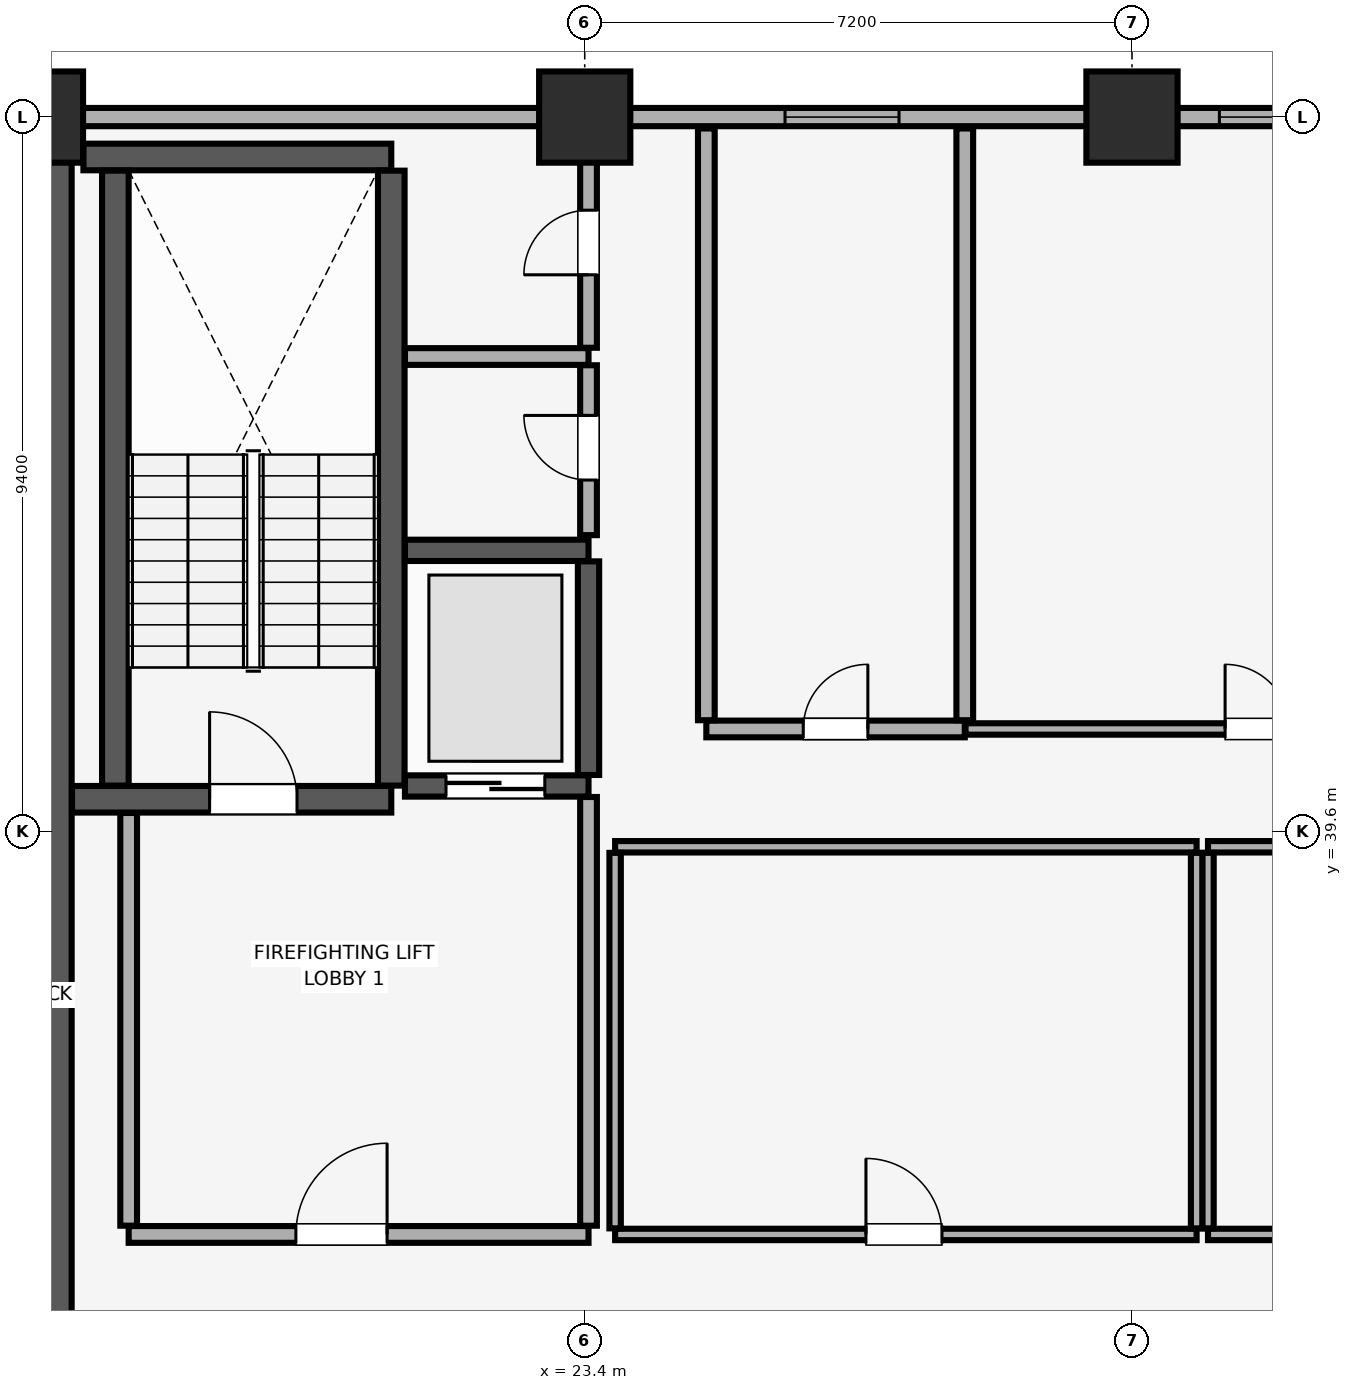
"""IFC4 building model, lengths in metres.
Left out: names, types, materials, properties, quantities, classifications, styles, units other than length and angle.
Written with IfcOpenShell. Run it as: python <this file> out.ifc"""

import sys

from ifc_helpers import new_model, si_unit, direction, frame, frame_2d, origin, origin_2d, place, context, subcontext, project, spatial, rectangle, extrude, element, fill, save


model = new_model("IFC4")
c1 = context("Model", 3, precision=1e-05, world=origin(), true_north=direction((0.0, 1.0)))
c2 = subcontext(c1, "Body", "Model", "MODEL_VIEW")
j1 = project(units=[si_unit("LENGTHUNIT", "METRE"), si_unit("PLANEANGLEUNIT", "RADIAN")], contexts=[c1])
p1 = place(None, origin())
s1 = spatial("IfcSite", under=j1, at=p1, CompositionType="ELEMENT")
p2 = place(p1, origin())
s2 = spatial("IfcBuilding", under=s1, at=p2, CompositionType="ELEMENT")
p3 = place(p2, frame((0.0, 0.0, 180.95)))
s3 = spatial("IfcBuildingStorey", under=s2, at=p3, CompositionType="ELEMENT", Elevation=180.95)
for number, where, z_axis, x_axis in (
    (1, (16.2, 49.0, 0.0), (0.0, 0.0, 1.0), (1.0, 0.0, 0.0)),
    (2, (23.4, 49.0, 0.0), (0.0, 0.0, 1.0), (1.0, 0.0, 0.0)),
    (3, (30.6, 49.0, 0.0), (0.0, 0.0, 1.0), (1.0, 0.0, 0.0)),
):
    element("IfcColumn", number, at=place(p3, frame(where, z_axis=z_axis, x_axis=x_axis)), inside=s3, PredefinedType="COLUMN", context=c2, shape_type="SweptSolid", body=[
        extrude(rectangle(XDim=1.2, YDim=1.2, at=origin_2d()), origin(), (0.0, 0.0, 1.0), 3.45),
    ])
p4 = place(p3, frame((77.0, 49.0, 0.0), z_axis=(0.0, 0.0, 1.0), x_axis=(-1.0, 0.0, 0.0)))
e4 = element("IfcWall", 4, at=p4, inside=s3, PredefinedType="SOLIDWALL", context=c2, shape_type="SweptSolid", body=[
    extrude(rectangle(XDim=70.0, YDim=0.24, at=frame_2d((35.0, 0.0))), origin(), (0.0, 0.0, 1.0), 2.65),
])
p5 = place(p4, frame((63.7, 0.0, 0.85)))
e5 = element("IfcOpeningElement", 5, at=p5, cuts=e4, PredefinedType="OPENING", context=c2, shape_type="SweptSolid", body=[
    extrude(rectangle(XDim=3.0, YDim=1.5, at=frame_2d((1.5, 0.75))), frame((0.0, 0.13, 0.0), z_axis=(0.0, -1.0, 0.0), x_axis=(1.0, 0.0, 0.0)), (0.0, 0.0, 1.0), 0.26),
])
p6 = place(p4, frame((3.3, 0.0, 0.85)))
e6 = element("IfcOpeningElement", 6, at=p6, cuts=e4, PredefinedType="OPENING", context=c2, shape_type="SweptSolid", body=[
    extrude(rectangle(XDim=3.0, YDim=1.5, at=frame_2d((1.5, 0.75))), frame((0.0, 0.13, 0.0), z_axis=(0.0, -1.0, 0.0), x_axis=(1.0, 0.0, 0.0)), (0.0, 0.0, 1.0), 0.26),
])
p7 = place(p4, frame((49.465, 0.0, 0.9)))
e7 = element("IfcOpeningElement", 7, at=p7, cuts=e4, PredefinedType="OPENING", context=c2, shape_type="SweptSolid", body=[
    extrude(rectangle(XDim=1.5, YDim=1.4, at=frame_2d((0.75, 0.7))), frame((0.0, 0.13, 0.0), z_axis=(0.0, -1.0, 0.0), x_axis=(1.0, 0.0, 0.0)), (0.0, 0.0, 1.0), 0.26),
])
p8 = place(p4, frame((41.65, 0.0, 0.9)))
e8 = element("IfcOpeningElement", 8, at=p8, cuts=e4, PredefinedType="OPENING", context=c2, shape_type="SweptSolid", body=[
    extrude(rectangle(XDim=3.6, YDim=1.5, at=frame_2d((1.8, 0.75))), frame((0.0, 0.13, 0.0), z_axis=(0.0, -1.0, 0.0), x_axis=(1.0, 0.0, 0.0)), (0.0, 0.0, 1.0), 0.26),
])
p9 = place(p4, frame((28.25, 0.0, 0.9)))
e9 = element("IfcOpeningElement", 9, at=p9, cuts=e4, PredefinedType="OPENING", context=c2, shape_type="SweptSolid", body=[
    extrude(rectangle(XDim=1.5, YDim=1.4, at=frame_2d((0.75, 0.7))), frame((0.0, 0.13, 0.0), z_axis=(0.0, -1.0, 0.0), x_axis=(1.0, 0.0, 0.0)), (0.0, 0.0, 1.0), 0.26),
])
p10 = place(p4, frame((24.6, 0.0, 0.9)))
e10 = element("IfcOpeningElement", 10, at=p10, cuts=e4, PredefinedType="OPENING", context=c2, shape_type="SweptSolid", body=[
    extrude(rectangle(XDim=2.4, YDim=1.5, at=frame_2d((1.2, 0.75))), frame((0.0, 0.13, 0.0), z_axis=(0.0, -1.0, 0.0), x_axis=(1.0, 0.0, 0.0)), (0.0, 0.0, 1.0), 0.26),
])
p11 = place(p4, frame((20.235, 0.0, 0.9)))
e11 = element("IfcOpeningElement", 11, at=p11, cuts=e4, PredefinedType="OPENING", context=c2, shape_type="SweptSolid", body=[
    extrude(rectangle(XDim=2.4, YDim=1.5, at=frame_2d((1.2, 0.75))), frame((0.0, 0.13, 0.0), z_axis=(0.0, -1.0, 0.0), x_axis=(1.0, 0.0, 0.0)), (0.0, 0.0, 1.0), 0.26),
])
p12 = place(p3, frame((16.2, 29.4, 0.0), z_axis=(0.0, 0.0, 1.0), x_axis=(0.0, 1.0, 0.0)))
e12 = element("IfcWall", 12, at=p12, inside=s3, PredefinedType="SHEAR", context=c2, shape_type="SweptSolid", body=[
    extrude(rectangle(XDim=19.2, YDim=0.9, at=frame_2d((9.6, 0.0))), origin(), (0.0, 0.0, 1.0), 3.45),
])
p13 = place(p3, frame((16.655, 40.025, 0.0), z_axis=(0.0, 0.0, 1.0), x_axis=(1.0, 0.0, 0.0)))
e13 = element("IfcWall", 13, at=p13, inside=s3, PredefinedType="SHEAR", context=c2, shape_type="SweptSolid", body=[
    extrude(rectangle(XDim=4.2, YDim=0.35, at=frame_2d((2.1, 0.0))), origin(), (0.0, 0.0, 1.0), 3.45),
])
p14 = place(p13, frame((1.81, 0.0, 0.0)))
e14 = element("IfcOpeningElement", 14, at=p14, cuts=e13, PredefinedType="OPENING", context=c2, shape_type="SweptSolid", body=[
    extrude(rectangle(XDim=1.15, YDim=2.15, at=frame_2d((0.575, 1.075))), frame((0.0, 0.185, 0.0), z_axis=(0.0, -1.0, 0.0), x_axis=(1.0, 0.0, 0.0)), (0.0, 0.0, 1.0), 0.37),
])
p15 = place(p3, frame((16.805, 48.475, 0.0), z_axis=(0.0, 0.0, 1.0), x_axis=(1.0, 0.0, 0.0)))
e15 = element("IfcWall", 15, at=p15, inside=s3, PredefinedType="SHEAR", context=c2, shape_type="SweptSolid", body=[
    extrude(rectangle(XDim=4.05, YDim=0.35, at=frame_2d((2.025, 0.0))), origin(), (0.0, 0.0, 1.0), 3.45),
])
for number, where, z_axis, x_axis in (
    (16, (17.225, 40.205, 0.0), (0.0, 0.0, 1.0), (0.0, 1.0, 0.0)),
    (17, (20.855, 40.205, 0.0), (0.0, 0.0, 1.0), (0.0, 1.0, 0.0)),
):
    element("IfcWall", number, at=place(p3, frame(where, z_axis=z_axis, x_axis=x_axis)), inside=s3, PredefinedType="SHEAR", context=c2, shape_type="SweptSolid", body=[
        extrude(rectangle(XDim=8.09, YDim=0.35, at=frame_2d((4.045, 0.0))), origin(), (0.0, 0.0, 1.0), 3.45),
    ])
p16 = place(p3, frame((21.035, 40.2, 0.0), z_axis=(0.0, 0.0, 1.0), x_axis=(1.0, 0.0, 0.0)))
e18 = element("IfcWall", 18, at=p16, inside=s3, PredefinedType="SHEAR", context=c2, shape_type="SweptSolid", body=[
    extrude(rectangle(XDim=2.415, YDim=0.28, at=frame_2d((1.208, 0.0))), origin(), (0.0, 0.0, 1.0), 3.45),
])
p17 = place(p16, frame((0.54, 0.0, 0.0)))
e19 = element("IfcOpeningElement", 19, at=p17, cuts=e18, PredefinedType="OPENING", context=c2, shape_type="SweptSolid", body=[
    extrude(rectangle(XDim=1.3, YDim=2.3, at=frame_2d((0.65, 1.15))), frame((0.0, 0.15, 0.0), z_axis=(0.0, -1.0, 0.0), x_axis=(1.0, 0.0, 0.0)), (0.0, 0.0, 1.0), 0.3),
])
p18 = place(p3, frame((21.035, 43.3, 0.0), z_axis=(0.0, 0.0, 1.0), x_axis=(1.0, 0.0, 0.0)))
e20 = element("IfcWall", 20, at=p18, inside=s3, PredefinedType="SHEAR", context=c2, shape_type="SweptSolid", body=[
    extrude(rectangle(XDim=2.415, YDim=0.28, at=frame_2d((1.208, 0.0))), origin(), (0.0, 0.0, 1.0), 3.45),
])
p19 = place(p3, frame((23.45, 40.345, 0.0), z_axis=(0.0, 0.0, 1.0), x_axis=(0.0, 1.0, 0.0)))
e21 = element("IfcWall", 21, at=p19, inside=s3, PredefinedType="SHEAR", context=c2, shape_type="SweptSolid", body=[
    extrude(rectangle(XDim=2.81, YDim=0.28, at=frame_2d((1.405, 0.0))), origin(), (0.0, 0.0, 1.0), 3.45),
])
p20 = place(p3, frame((17.4, 34.3, 0.0), z_axis=(0.0, 0.0, 1.0), x_axis=(1.0, 0.0, 0.0)))
e22 = element("IfcWall", 22, at=p20, inside=s3, PredefinedType="PARTITIONING", context=c2, shape_type="SweptSolid", body=[
    extrude(rectangle(XDim=6.05, YDim=0.22, at=frame_2d((3.025, 0.0))), origin(), (0.0, 0.0, 1.0), 3.45),
])
p21 = place(p20, frame((2.2, 0.0, 0.0)))
e23 = element("IfcOpeningElement", 23, at=p21, cuts=e22, PredefinedType="OPENING", context=c2, shape_type="SweptSolid", body=[
    extrude(rectangle(XDim=1.2, YDim=2.15, at=frame_2d((0.6, 1.075))), frame((0.0, 0.12, 0.0), z_axis=(0.0, -1.0, 0.0), x_axis=(1.0, 0.0, 0.0)), (0.0, 0.0, 1.0), 0.24),
])
p22 = place(p3, frame((17.4, 34.415, 0.0), z_axis=(0.0, 0.0, 1.0), x_axis=(0.0, 1.0, 0.0)))
e24 = element("IfcWall", 24, at=p22, inside=s3, PredefinedType="PARTITIONING", context=c2, shape_type="SweptSolid", body=[
    extrude(rectangle(XDim=5.43, YDim=0.22, at=frame_2d((2.715, 0.0))), origin(), (0.0, 0.0, 1.0), 3.45),
])
p23 = place(p3, frame((23.45, 34.415, 0.0), z_axis=(0.0, 0.0, 1.0), x_axis=(0.0, 1.0, 0.0)))
e25 = element("IfcWall", 25, at=p23, inside=s3, PredefinedType="PARTITIONING", context=c2, shape_type="SweptSolid", body=[
    extrude(rectangle(XDim=5.64, YDim=0.22, at=frame_2d((2.82, 0.0))), origin(), (0.0, 0.0, 1.0), 3.45),
])
p24 = place(p3, frame((21.035, 45.85, 0.0), z_axis=(0.0, 0.0, 1.0), x_axis=(1.0, 0.0, 0.0)))
e26 = element("IfcWall", 26, at=p24, inside=s3, PredefinedType="PARTITIONING", context=c2, shape_type="SweptSolid", body=[
    extrude(rectangle(XDim=2.415, YDim=0.22, at=frame_2d((1.208, 0.0))), origin(), (0.0, 0.0, 1.0), 3.45),
])
p25 = place(p3, frame((23.45, 43.5, 0.0), z_axis=(0.0, 0.0, 1.0), x_axis=(0.0, 1.0, 0.0)))
e27 = element("IfcWall", 27, at=p25, inside=s3, PredefinedType="PARTITIONING", context=c2, shape_type="SweptSolid", body=[
    extrude(rectangle(XDim=2.235, YDim=0.22, at=frame_2d((1.118, 0.0))), origin(), (0.0, 0.0, 1.0), 3.45),
])
p26 = place(p25, frame((0.725, 0.0, 0.0)))
e28 = element("IfcOpeningElement", 28, at=p26, cuts=e27, PredefinedType="OPENING", context=c2, shape_type="SweptSolid", body=[
    extrude(rectangle(XDim=0.85, YDim=2.1, at=frame_2d((0.425, 1.05))), frame((0.0, 0.12, 0.0), z_axis=(0.0, -1.0, 0.0), x_axis=(1.0, 0.0, 0.0)), (0.0, 0.0, 1.0), 0.24),
])
p27 = place(p3, frame((23.45, 45.965, 0.0), z_axis=(0.0, 0.0, 1.0), x_axis=(0.0, 1.0, 0.0)))
e29 = element("IfcWall", 29, at=p27, inside=s3, PredefinedType="PARTITIONING", context=c2, shape_type="SweptSolid", body=[
    extrude(rectangle(XDim=2.885, YDim=0.22, at=frame_2d((1.442, 0.0))), origin(), (0.0, 0.0, 1.0), 3.45),
])
p28 = place(p27, frame((0.96, 0.0, 0.0)))
e30 = element("IfcOpeningElement", 30, at=p28, cuts=e29, PredefinedType="OPENING", context=c2, shape_type="SweptSolid", body=[
    extrude(rectangle(XDim=0.85, YDim=2.1, at=frame_2d((0.425, 1.05))), frame((0.0, 0.12, 0.0), z_axis=(0.0, -1.0, 0.0), x_axis=(1.0, 0.0, 0.0)), (0.0, 0.0, 1.0), 0.24),
])
p29 = place(p3, frame((31.6, 34.3, 0.0), z_axis=(0.0, 0.0, 1.0), x_axis=(1.0, 0.0, 0.0)))
e31 = element("IfcWall", 31, at=p29, inside=s3, PredefinedType="PARTITIONING", context=c2, shape_type="SweptSolid", body=[
    extrude(rectangle(XDim=5.2, YDim=0.15, at=frame_2d((2.6, 0.0))), origin(), (0.0, 0.0, 1.0), 3.45),
])
p30 = place(p29, frame((2.175, 0.0, 0.0)))
e32 = element("IfcOpeningElement", 32, at=p30, cuts=e31, PredefinedType="OPENING", context=c2, shape_type="SweptSolid", body=[
    extrude(rectangle(XDim=0.85, YDim=2.1, at=frame_2d((0.425, 1.05))), frame((0.0, 0.085, 0.0), z_axis=(0.0, -1.0, 0.0), x_axis=(1.0, 0.0, 0.0)), (0.0, 0.0, 1.0), 0.17),
])
p31 = place(p3, frame((31.6, 39.4, 0.0), z_axis=(0.0, 0.0, 1.0), x_axis=(1.0, 0.0, 0.0)))
e33 = element("IfcWall", 33, at=p31, inside=s3, PredefinedType="PARTITIONING", context=c2, shape_type="SweptSolid", body=[
    extrude(rectangle(XDim=5.2, YDim=0.15, at=frame_2d((2.6, 0.0))), origin(), (0.0, 0.0, 1.0), 3.45),
])
p32 = place(p3, frame((31.6, 34.38, 0.0), z_axis=(0.0, 0.0, 1.0), x_axis=(0.0, 1.0, 0.0)))
e34 = element("IfcWall", 34, at=p32, inside=s3, PredefinedType="PARTITIONING", context=c2, shape_type="SweptSolid", body=[
    extrude(rectangle(XDim=4.94, YDim=0.15, at=frame_2d((2.47, 0.0))), origin(), (0.0, 0.0, 1.0), 3.45),
])
p33 = place(p3, frame((23.8, 34.3, 0.0), z_axis=(0.0, 0.0, 1.0), x_axis=(1.0, 0.0, 0.0)))
e35 = element("IfcWall", 35, at=p33, inside=s3, PredefinedType="PARTITIONING", context=c2, shape_type="SweptSolid", body=[
    extrude(rectangle(XDim=7.65, YDim=0.15, at=frame_2d((3.825, 0.0))), origin(), (0.0, 0.0, 1.0), 3.45),
])
p34 = place(p33, frame((3.3, 0.0, 0.0)))
e36 = element("IfcOpeningElement", 36, at=p34, cuts=e35, PredefinedType="OPENING", context=c2, shape_type="SweptSolid", body=[
    extrude(rectangle(XDim=1.0, YDim=2.15, at=frame_2d((0.5, 1.075))), frame((0.0, 0.085, 0.0), z_axis=(0.0, -1.0, 0.0), x_axis=(1.0, 0.0, 0.0)), (0.0, 0.0, 1.0), 0.17),
])
p35 = place(p3, frame((23.8, 39.4, 0.0), z_axis=(0.0, 0.0, 1.0), x_axis=(1.0, 0.0, 0.0)))
e37 = element("IfcWall", 37, at=p35, inside=s3, PredefinedType="PARTITIONING", context=c2, shape_type="SweptSolid", body=[
    extrude(rectangle(XDim=7.65, YDim=0.15, at=frame_2d((3.825, 0.0))), origin(), (0.0, 0.0, 1.0), 3.45),
])
for number, where, z_axis, x_axis in (
    (38, (23.8, 34.38, 0.0), (0.0, 0.0, 1.0), (0.0, 1.0, 0.0)),
    (39, (31.45, 34.38, 0.0), (0.0, 0.0, 1.0), (0.0, 1.0, 0.0)),
):
    element("IfcWall", number, at=place(p3, frame(where, z_axis=z_axis, x_axis=x_axis)), inside=s3, PredefinedType="PARTITIONING", context=c2, shape_type="SweptSolid", body=[
        extrude(rectangle(XDim=4.94, YDim=0.15, at=frame_2d((2.47, 0.0))), origin(), (0.0, 0.0, 1.0), 3.45),
    ])
p36 = place(p3, frame((25.0, 40.95, 0.0), z_axis=(0.0, 0.0, 1.0), x_axis=(1.0, 0.0, 0.0)))
e40 = element("IfcWall", 40, at=p36, inside=s3, PredefinedType="PARTITIONING", context=c2, shape_type="SweptSolid", body=[
    extrude(rectangle(XDim=3.4, YDim=0.22, at=frame_2d((1.7, 0.0))), origin(), (0.0, 0.0, 1.0), 3.45),
])
p37 = place(p36, frame((1.275, 0.0, 0.0)))
e41 = element("IfcOpeningElement", 41, at=p37, cuts=e40, PredefinedType="OPENING", context=c2, shape_type="SweptSolid", body=[
    extrude(rectangle(XDim=0.85, YDim=2.1, at=frame_2d((0.425, 1.05))), frame((0.0, 0.12, 0.0), z_axis=(0.0, -1.0, 0.0), x_axis=(1.0, 0.0, 0.0)), (0.0, 0.0, 1.0), 0.24),
])
for number, where, z_axis, x_axis in (
    (42, (25.0, 41.065, 0.0), (0.0, 0.0, 1.0), (0.0, 1.0, 0.0)),
    (43, (28.4, 41.065, 0.0), (0.0, 0.0, 1.0), (0.0, 1.0, 0.0)),
):
    element("IfcWall", number, at=place(p3, frame(where, z_axis=z_axis, x_axis=x_axis)), inside=s3, PredefinedType="PARTITIONING", context=c2, shape_type="SweptSolid", body=[
        extrude(rectangle(XDim=7.785, YDim=0.22, at=frame_2d((3.893, 0.0))), origin(), (0.0, 0.0, 1.0), 3.45),
    ])
p38 = place(p3, frame((28.41, 40.95, 0.0), z_axis=(0.0, 0.0, 1.0), x_axis=(1.0, 0.0, 0.0)))
e44 = element("IfcWall", 44, at=p38, inside=s3, PredefinedType="PARTITIONING", context=c2, shape_type="SweptSolid", body=[
    extrude(rectangle(XDim=7.69, YDim=0.15, at=frame_2d((3.845, 0.0))), origin(), (0.0, 0.0, 1.0), 3.45),
])
p39 = place(p38, frame((3.415, 0.0, 0.0)))
e45 = element("IfcOpeningElement", 45, at=p39, cuts=e44, PredefinedType="OPENING", context=c2, shape_type="SweptSolid", body=[
    extrude(rectangle(XDim=0.85, YDim=2.1, at=frame_2d((0.425, 1.05))), frame((0.0, 0.085, 0.0), z_axis=(0.0, -1.0, 0.0), x_axis=(1.0, 0.0, 0.0)), (0.0, 0.0, 1.0), 0.17),
])
p40 = place(p7, origin())
e46 = element("IfcWindow", 46, at=p40, inside=s3, PartitioningType="SINGLE_PANEL", PredefinedType="WINDOW", context=c2, shape_type="SweptSolid", body=[
    extrude(rectangle(XDim=1.5, YDim=1.4, at=frame_2d((0.75, 0.7))), frame((0.0, 0.03, 0.0), z_axis=(0.0, -1.0, 0.0), x_axis=(1.0, 0.0, 0.0)), (0.0, 0.0, 1.0), 0.06),
])
fill(e7, e46)
p41 = place(p8, origin())
e47 = element("IfcWindow", 47, at=p41, inside=s3, PartitioningType="SINGLE_PANEL", PredefinedType="WINDOW", context=c2, shape_type="SweptSolid", body=[
    extrude(rectangle(XDim=3.6, YDim=1.5, at=frame_2d((1.8, 0.75))), frame((0.0, 0.03, 0.0), z_axis=(0.0, -1.0, 0.0), x_axis=(1.0, 0.0, 0.0)), (0.0, 0.0, 1.0), 0.06),
])
fill(e8, e47)
p42 = place(p14, origin())
e48 = element("IfcDoor", 48, at=p42, inside=s3, OperationType="SINGLE_SWING_LEFT", PredefinedType="DOOR", context=c2, shape_type="SweptSolid", body=[
    extrude(rectangle(XDim=1.15, YDim=2.15, at=frame_2d((0.575, 1.075))), frame((0.0, 0.025, 0.0), z_axis=(0.0, -1.0, 0.0), x_axis=(1.0, 0.0, 0.0)), (0.0, 0.0, 1.0), 0.05),
])
fill(e14, e48)
p43 = place(p17, origin())
e49 = element("IfcDoor", 49, at=p43, inside=s3, OperationType="DOUBLE_DOOR_SLIDING", PredefinedType="DOOR", context=c2, shape_type="SweptSolid", body=[
    extrude(rectangle(XDim=1.3, YDim=2.3, at=frame_2d((0.65, 1.15))), frame((0.0, 0.025, 0.0), z_axis=(0.0, -1.0, 0.0), x_axis=(1.0, 0.0, 0.0)), (0.0, 0.0, 1.0), 0.05),
])
fill(e19, e49)
p44 = place(p21, origin())
e50 = element("IfcDoor", 50, at=p44, inside=s3, OperationType="SINGLE_SWING_RIGHT", PredefinedType="DOOR", context=c2, shape_type="SweptSolid", body=[
    extrude(rectangle(XDim=1.2, YDim=2.15, at=frame_2d((0.6, 1.075))), frame((0.0, 0.025, 0.0), z_axis=(0.0, -1.0, 0.0), x_axis=(1.0, 0.0, 0.0)), (0.0, 0.0, 1.0), 0.05),
])
fill(e23, e50)
p45 = place(p26, origin())
e51 = element("IfcDoor", 51, at=p45, inside=s3, OperationType="SINGLE_SWING_RIGHT", PredefinedType="DOOR", context=c2, shape_type="SweptSolid", body=[
    extrude(rectangle(XDim=0.85, YDim=2.1, at=frame_2d((0.425, 1.05))), frame((0.0, 0.025, 0.0), z_axis=(0.0, -1.0, 0.0), x_axis=(1.0, 0.0, 0.0)), (0.0, 0.0, 1.0), 0.05),
])
fill(e28, e51)
p46 = place(p28, origin())
e52 = element("IfcDoor", 52, at=p46, inside=s3, OperationType="SINGLE_SWING_LEFT", PredefinedType="DOOR", context=c2, shape_type="SweptSolid", body=[
    extrude(rectangle(XDim=0.85, YDim=2.1, at=frame_2d((0.425, 1.05))), frame((0.0, 0.025, 0.0), z_axis=(0.0, -1.0, 0.0), x_axis=(1.0, 0.0, 0.0)), (0.0, 0.0, 1.0), 0.05),
])
fill(e30, e52)
p47 = place(p34, origin())
e53 = element("IfcDoor", 53, at=p47, inside=s3, OperationType="SINGLE_SWING_LEFT", PredefinedType="DOOR", context=c2, shape_type="SweptSolid", body=[
    extrude(rectangle(XDim=1.0, YDim=2.15, at=frame_2d((0.5, 1.075))), frame((0.0, 0.025, 0.0), z_axis=(0.0, -1.0, 0.0), x_axis=(1.0, 0.0, 0.0)), (0.0, 0.0, 1.0), 0.05),
])
fill(e36, e53)
p48 = place(p37, origin())
e54 = element("IfcDoor", 54, at=p48, inside=s3, OperationType="SINGLE_SWING_RIGHT", PredefinedType="DOOR", context=c2, shape_type="SweptSolid", body=[
    extrude(rectangle(XDim=0.85, YDim=2.1, at=frame_2d((0.425, 1.05))), frame((0.0, 0.025, 0.0), z_axis=(0.0, -1.0, 0.0), x_axis=(1.0, 0.0, 0.0)), (0.0, 0.0, 1.0), 0.05),
])
fill(e41, e54)
p49 = place(p39, origin())
e55 = element("IfcDoor", 55, at=p49, inside=s3, OperationType="SINGLE_SWING_LEFT", PredefinedType="DOOR", context=c2, shape_type="SweptSolid", body=[
    extrude(rectangle(XDim=0.85, YDim=2.1, at=frame_2d((0.425, 1.05))), frame((0.0, 0.025, 0.0), z_axis=(0.0, -1.0, 0.0), x_axis=(1.0, 0.0, 0.0)), (0.0, 0.0, 1.0), 0.05),
])
fill(e45, e55)
save(model, sys.argv[1])
